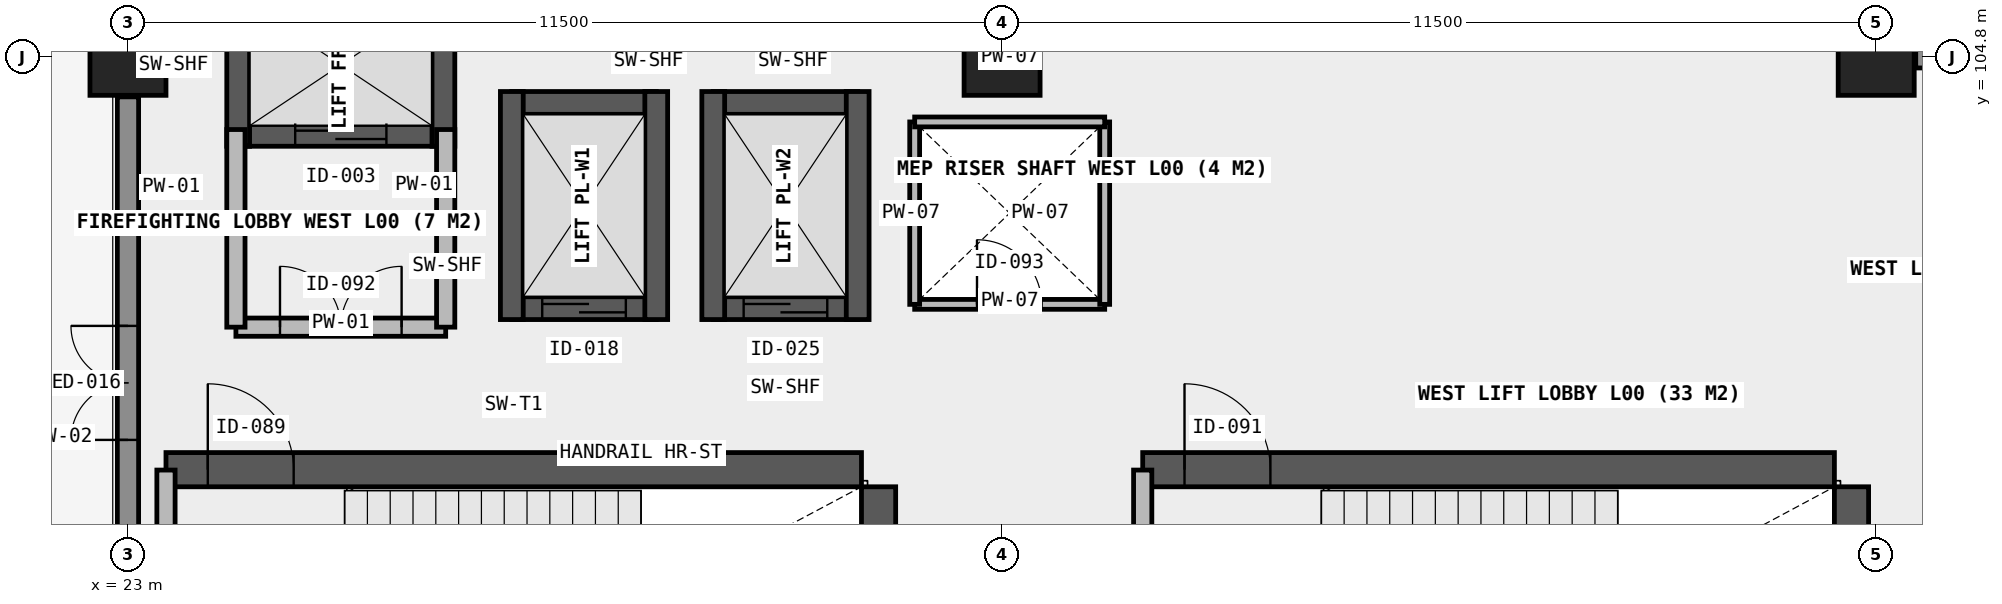
"""IFC4 building model, lengths in metres.
Left out: names, types, materials, properties, quantities, classifications, styles, units other than length and angle.
Written with IfcOpenShell. Run it as: python <this file> out.ifc"""

import sys

from ifc_helpers import new_model, si_unit, direction, frame, frame_2d, origin, origin_2d, place, context, subcontext, project, spatial, rectangle, extrude, element, fill, save


model = new_model("IFC4")
c1 = context("Model", 3, precision=1e-05, world=origin(), true_north=direction((0.0, 1.0)))
c2 = subcontext(c1, "Body", "Model", "MODEL_VIEW")
j1 = project(units=[si_unit("LENGTHUNIT", "METRE"), si_unit("PLANEANGLEUNIT", "RADIAN")], contexts=[c1])
p1 = place(None, origin())
s1 = spatial("IfcSite", under=j1, at=p1, CompositionType="ELEMENT")
p2 = place(p1, origin())
s2 = spatial("IfcBuilding", under=s1, at=p2, CompositionType="ELEMENT")
p3 = place(p2, origin())
s3 = spatial("IfcBuildingStorey", under=s2, at=p3, CompositionType="ELEMENT", Elevation=0.0)
for number, where, z_axis, x_axis in (
    (1, (23.0, 104.8, 0.0), (0.0, 0.0, 1.0), (1.0, 0.0, 0.0)),
    (2, (34.5, 104.8, 0.0), (0.0, 0.0, 1.0), (1.0, 0.0, 0.0)),
    (3, (46.0, 104.8, 0.0), (0.0, 0.0, 1.0), (1.0, 0.0, 0.0)),
):
    element("IfcColumn", number, at=place(p3, frame(where, z_axis=z_axis, x_axis=x_axis)), inside=s3, PredefinedType="COLUMN", context=c2, shape_type="SweptSolid", body=[
        extrude(rectangle(XDim=1.0, YDim=1.0, at=origin_2d()), origin(), (0.0, 0.0, 1.0), 4.2),
    ])
p4 = place(p3, frame((24.45, 103.78, 0.0), z_axis=(0.0, 0.0, 1.0), x_axis=(1.0, 0.0, 0.0)))
e4 = element("IfcWall", 4, at=p4, inside=s3, PredefinedType="SHEAR", context=c2, shape_type="SweptSolid", body=[
    extrude(rectangle(XDim=2.7, YDim=0.3, at=frame_2d((1.35, 0.0))), origin(), (0.0, 0.0, 1.0), 4.2),
])
p5 = place(p4, frame((0.75, 0.0, 0.0)))
e5 = element("IfcOpeningElement", 5, at=p5, cuts=e4, PredefinedType="OPENING", context=c2, shape_type="SweptSolid", body=[
    extrude(rectangle(XDim=1.2, YDim=2.15, at=frame_2d((0.6, 1.075))), frame((0.0, 0.16, 0.0), z_axis=(0.0, -1.0, 0.0), x_axis=(1.0, 0.0, 0.0)), (0.0, 0.0, 1.0), 0.32),
])
for number, where, z_axis, x_axis in (
    (6, (24.45, 103.63, 0.0), (0.0, 0.0, 1.0), (0.0, 1.0, 0.0)),
    (7, (27.15, 103.63, 0.0), (0.0, 0.0, 1.0), (0.0, 1.0, 0.0)),
):
    element("IfcWall", number, at=place(p3, frame(where, z_axis=z_axis, x_axis=x_axis)), inside=s3, PredefinedType="SHEAR", context=c2, shape_type="SweptSolid", body=[
        extrude(rectangle(XDim=2.14, YDim=0.3, at=frame_2d((1.07, 0.0))), origin(), (0.0, 0.0, 1.0), 4.2),
    ])
p6 = place(p3, frame((28.05, 101.5, 0.0), z_axis=(0.0, 0.0, 1.0), x_axis=(1.0, 0.0, 0.0)))
e8 = element("IfcWall", 8, at=p6, inside=s3, PredefinedType="SHEAR", context=c2, shape_type="SweptSolid", body=[
    extrude(rectangle(XDim=1.9, YDim=0.3, at=frame_2d((0.95, 0.0))), origin(), (0.0, 0.0, 1.0), 4.2),
])
p7 = place(p6, frame((0.4, 0.0, 0.0)))
e9 = element("IfcOpeningElement", 9, at=p7, cuts=e8, PredefinedType="OPENING", context=c2, shape_type="SweptSolid", body=[
    extrude(rectangle(XDim=1.1, YDim=2.15, at=frame_2d((0.55, 1.075))), frame((0.0, 0.16, 0.0), z_axis=(0.0, -1.0, 0.0), x_axis=(1.0, 0.0, 0.0)), (0.0, 0.0, 1.0), 0.32),
])
p8 = place(p3, frame((28.05, 104.2, 0.0), z_axis=(0.0, 0.0, 1.0), x_axis=(1.0, 0.0, 0.0)))
e10 = element("IfcWall", 10, at=p8, inside=s3, PredefinedType="SHEAR", context=c2, shape_type="SweptSolid", body=[
    extrude(rectangle(XDim=1.9, YDim=0.3, at=frame_2d((0.95, 0.0))), origin(), (0.0, 0.0, 1.0), 4.2),
])
for number, where, z_axis, x_axis in (
    (11, (28.05, 101.35, 0.0), (0.0, 0.0, 1.0), (0.0, 1.0, 0.0)),
    (12, (29.95, 101.35, 0.0), (0.0, 0.0, 1.0), (0.0, 1.0, 0.0)),
):
    element("IfcWall", number, at=place(p3, frame(where, z_axis=z_axis, x_axis=x_axis)), inside=s3, PredefinedType="SHEAR", context=c2, shape_type="SweptSolid", body=[
        extrude(rectangle(XDim=3.0, YDim=0.3, at=frame_2d((1.5, 0.0))), origin(), (0.0, 0.0, 1.0), 4.2),
    ])
p9 = place(p3, frame((30.7, 101.5, 0.0), z_axis=(0.0, 0.0, 1.0), x_axis=(1.0, 0.0, 0.0)))
e13 = element("IfcWall", 13, at=p9, inside=s3, PredefinedType="SHEAR", context=c2, shape_type="SweptSolid", body=[
    extrude(rectangle(XDim=1.9, YDim=0.3, at=frame_2d((0.95, 0.0))), origin(), (0.0, 0.0, 1.0), 4.2),
])
p10 = place(p9, frame((0.4, 0.0, 0.0)))
e14 = element("IfcOpeningElement", 14, at=p10, cuts=e13, PredefinedType="OPENING", context=c2, shape_type="SweptSolid", body=[
    extrude(rectangle(XDim=1.1, YDim=2.15, at=frame_2d((0.55, 1.075))), frame((0.0, 0.16, 0.0), z_axis=(0.0, -1.0, 0.0), x_axis=(1.0, 0.0, 0.0)), (0.0, 0.0, 1.0), 0.32),
])
p11 = place(p3, frame((30.7, 104.2, 0.0), z_axis=(0.0, 0.0, 1.0), x_axis=(1.0, 0.0, 0.0)))
e15 = element("IfcWall", 15, at=p11, inside=s3, PredefinedType="SHEAR", context=c2, shape_type="SweptSolid", body=[
    extrude(rectangle(XDim=1.9, YDim=0.3, at=frame_2d((0.95, 0.0))), origin(), (0.0, 0.0, 1.0), 4.2),
])
for number, where, z_axis, x_axis in (
    (16, (30.7, 101.35, 0.0), (0.0, 0.0, 1.0), (0.0, 1.0, 0.0)),
    (17, (32.6, 101.35, 0.0), (0.0, 0.0, 1.0), (0.0, 1.0, 0.0)),
):
    element("IfcWall", number, at=place(p3, frame(where, z_axis=z_axis, x_axis=x_axis)), inside=s3, PredefinedType="SHEAR", context=c2, shape_type="SweptSolid", body=[
        extrude(rectangle(XDim=3.0, YDim=0.3, at=frame_2d((1.5, 0.0))), origin(), (0.0, 0.0, 1.0), 4.2),
    ])
p12 = place(p3, frame((23.5, 99.375, 0.0), z_axis=(0.0, 0.0, 1.0), x_axis=(1.0, 0.0, 0.0)))
e18 = element("IfcWall", 18, at=p12, inside=s3, PredefinedType="SHEAR", context=c2, shape_type="SweptSolid", body=[
    extrude(rectangle(XDim=9.15, YDim=0.45, at=frame_2d((4.575, 0.0))), origin(), (0.0, 0.0, 1.0), 4.2),
])
p13 = place(p12, frame((0.55, 0.0, 0.0)))
e19 = element("IfcOpeningElement", 19, at=p13, cuts=e18, PredefinedType="OPENING", context=c2, shape_type="SweptSolid", body=[
    extrude(rectangle(XDim=1.13, YDim=2.15, at=frame_2d((0.565, 1.075))), frame((0.0, 0.235, 0.0), z_axis=(0.0, -1.0, 0.0), x_axis=(1.0, 0.0, 0.0)), (0.0, 0.0, 1.0), 0.47),
])
p14 = place(p3, frame((32.875, 95.55, 0.0), z_axis=(0.0, 0.0, 1.0), x_axis=(0.0, 1.0, 0.0)))
e20 = element("IfcWall", 20, at=p14, inside=s3, PredefinedType="SHEAR", context=c2, shape_type="SweptSolid", body=[
    extrude(rectangle(XDim=3.6, YDim=0.45, at=frame_2d((1.8, 0.0))), origin(), (0.0, 0.0, 1.0), 4.2),
])
p15 = place(p3, frame((36.35, 99.375, 0.0), z_axis=(0.0, 0.0, 1.0), x_axis=(1.0, 0.0, 0.0)))
e21 = element("IfcWall", 21, at=p15, inside=s3, PredefinedType="SHEAR", context=c2, shape_type="SweptSolid", body=[
    extrude(rectangle(XDim=9.1, YDim=0.45, at=frame_2d((4.55, 0.0))), origin(), (0.0, 0.0, 1.0), 4.2),
])
p16 = place(p15, frame((0.55, 0.0, 0.0)))
e22 = element("IfcOpeningElement", 22, at=p16, cuts=e21, PredefinedType="OPENING", context=c2, shape_type="SweptSolid", body=[
    extrude(rectangle(XDim=1.13, YDim=2.15, at=frame_2d((0.565, 1.075))), frame((0.0, 0.235, 0.0), z_axis=(0.0, -1.0, 0.0), x_axis=(1.0, 0.0, 0.0)), (0.0, 0.0, 1.0), 0.47),
])
p17 = place(p3, frame((45.675, 95.32, 0.0), z_axis=(0.0, 0.0, 1.0), x_axis=(0.0, 1.0, 0.0)))
e23 = element("IfcWall", 23, at=p17, inside=s3, PredefinedType="SHEAR", context=c2, shape_type="SweptSolid", body=[
    extrude(rectangle(XDim=3.83, YDim=0.45, at=frame_2d((1.915, 0.0))), origin(), (0.0, 0.0, 1.0), 4.2),
])
p18 = place(p3, frame((46.52, 104.8, 0.0), z_axis=(0.0, 0.0, 1.0), x_axis=(1.0, 0.0, 0.0)))
e24 = element("IfcWall", 24, at=p18, inside=s3, PredefinedType="SOLIDWALL", context=c2, shape_type="SweptSolid", body=[
    extrude(rectangle(XDim=10.46, YDim=0.28, at=frame_2d((5.23, 0.0))), origin(), (0.0, 0.0, 1.0), 3.15),
])
p19 = place(p18, frame((4.23, 0.0, 0.0)))
e25 = element("IfcOpeningElement", 25, at=p19, cuts=e24, PredefinedType="OPENING", context=c2, shape_type="SweptSolid", body=[
    extrude(rectangle(XDim=2.0, YDim=2.4, at=frame_2d((1.0, 1.2))), frame((0.0, 0.15, 0.0), z_axis=(0.0, -1.0, 0.0), x_axis=(1.0, 0.0, 0.0)), (0.0, 0.0, 1.0), 0.3),
])
p20 = place(p18, frame((1.215, 0.0, 0.78)))
e26 = element("IfcOpeningElement", 26, at=p20, cuts=e24, PredefinedType="OPENING", context=c2, shape_type="SweptSolid", body=[
    extrude(rectangle(XDim=1.8, YDim=1.95, at=frame_2d((0.9, 0.975))), frame((0.0, 0.15, 0.0), z_axis=(0.0, -1.0, 0.0), x_axis=(1.0, 0.0, 0.0)), (0.0, 0.0, 1.0), 0.3),
])
p21 = place(p3, frame((23.0, 95.32, 0.0), z_axis=(0.0, 0.0, 1.0), x_axis=(0.0, 1.0, 0.0)))
e27 = element("IfcWall", 27, at=p21, inside=s3, PredefinedType="SOLIDWALL", context=c2, shape_type="SweptSolid", body=[
    extrude(rectangle(XDim=8.96, YDim=0.28, at=frame_2d((4.48, 0.0))), origin(), (0.0, 0.0, 1.0), 3.15),
])
p22 = place(p21, frame((4.447, 0.0, 0.0)))
e28 = element("IfcOpeningElement", 28, at=p22, cuts=e27, PredefinedType="OPENING", context=c2, shape_type="SweptSolid", body=[
    extrude(rectangle(XDim=1.5, YDim=2.3, at=frame_2d((0.75, 1.15))), frame((0.0, 0.15, 0.0), z_axis=(0.0, -1.0, 0.0), x_axis=(1.0, 0.0, 0.0)), (0.0, 0.0, 1.0), 0.3),
])
p23 = place(p21, frame((1.323, 0.0, 0.78)))
e29 = element("IfcOpeningElement", 29, at=p23, cuts=e27, PredefinedType="OPENING", context=c2, shape_type="SweptSolid", body=[
    extrude(rectangle(XDim=1.8, YDim=1.95, at=frame_2d((0.9, 0.975))), frame((0.0, 0.15, 0.0), z_axis=(0.0, -1.0, 0.0), x_axis=(1.0, 0.0, 0.0)), (0.0, 0.0, 1.0), 0.3),
])
p24 = place(p3, frame((23.5, 95.33, 0.0), z_axis=(0.0, 0.0, 1.0), x_axis=(0.0, 1.0, 0.0)))
e30 = element("IfcWall", 30, at=p24, inside=s3, PredefinedType="SOLIDWALL", context=c2, shape_type="SweptSolid", body=[
    extrude(rectangle(XDim=4.04, YDim=0.24, at=frame_2d((2.02, 0.0))), origin(), (0.0, 0.0, 1.0), 3.88),
])
p25 = place(p24, frame((1.45, 0.0, 0.0)))
e31 = element("IfcOpeningElement", 31, at=p25, cuts=e30, PredefinedType="OPENING", context=c2, shape_type="SweptSolid", body=[
    extrude(rectangle(XDim=1.13, YDim=2.15, at=frame_2d((0.565, 1.075))), frame((0.0, 0.13, 0.0), z_axis=(0.0, -1.0, 0.0), x_axis=(1.0, 0.0, 0.0)), (0.0, 0.0, 1.0), 0.26),
])
p26 = place(p3, frame((36.35, 95.33, 0.0), z_axis=(0.0, 0.0, 1.0), x_axis=(0.0, 1.0, 0.0)))
e32 = element("IfcWall", 32, at=p26, inside=s3, PredefinedType="SOLIDWALL", context=c2, shape_type="SweptSolid", body=[
    extrude(rectangle(XDim=4.04, YDim=0.24, at=frame_2d((2.02, 0.0))), origin(), (0.0, 0.0, 1.0), 3.88),
])
p27 = place(p26, frame((1.45, 0.0, 0.0)))
e33 = element("IfcOpeningElement", 33, at=p27, cuts=e32, PredefinedType="OPENING", context=c2, shape_type="SweptSolid", body=[
    extrude(rectangle(XDim=1.13, YDim=2.15, at=frame_2d((0.565, 1.075))), frame((0.0, 0.13, 0.0), z_axis=(0.0, -1.0, 0.0), x_axis=(1.0, 0.0, 0.0)), (0.0, 0.0, 1.0), 0.26),
])
p28 = place(p3, frame((24.42, 101.25, 0.0), z_axis=(0.0, 0.0, 1.0), x_axis=(1.0, 0.0, 0.0)))
e34 = element("IfcWall", 34, at=p28, inside=s3, PredefinedType="SOLIDWALL", context=c2, shape_type="SweptSolid", body=[
    extrude(rectangle(XDim=2.76, YDim=0.24, at=frame_2d((1.38, 0.0))), origin(), (0.0, 0.0, 1.0), 3.88),
])
p29 = place(p28, frame((0.58, 0.0, 0.0)))
e35 = element("IfcOpeningElement", 35, at=p29, cuts=e34, PredefinedType="OPENING", context=c2, shape_type="SweptSolid", body=[
    extrude(rectangle(XDim=1.6, YDim=2.15, at=frame_2d((0.8, 1.075))), frame((0.0, 0.13, 0.0), z_axis=(0.0, -1.0, 0.0), x_axis=(1.0, 0.0, 0.0)), (0.0, 0.0, 1.0), 0.26),
])
for number, where, z_axis, x_axis in (
    (36, (24.42, 101.25, 0.0), (0.0, 0.0, 1.0), (0.0, 1.0, 0.0)),
    (37, (27.18, 101.25, 0.0), (0.0, 0.0, 1.0), (0.0, 1.0, 0.0)),
):
    element("IfcWall", number, at=place(p3, frame(where, z_axis=z_axis, x_axis=x_axis)), inside=s3, PredefinedType="SOLIDWALL", context=c2, shape_type="SweptSolid", body=[
        extrude(rectangle(XDim=2.6, YDim=0.24, at=frame_2d((1.3, 0.0))), origin(), (0.0, 0.0, 1.0), 3.88),
    ])
p30 = place(p3, frame((33.35, 101.55, 0.0), z_axis=(0.0, 0.0, 1.0), x_axis=(1.0, 0.0, 0.0)))
e38 = element("IfcWall", 38, at=p30, inside=s3, PredefinedType="PLUMBINGWALL", context=c2, shape_type="SweptSolid", body=[
    extrude(rectangle(XDim=2.5, YDim=0.13, at=frame_2d((1.25, 0.0))), origin(), (0.0, 0.0, 1.0), 3.88),
])
p31 = place(p30, frame((0.82, 0.0, 0.0)))
e39 = element("IfcOpeningElement", 39, at=p31, cuts=e38, PredefinedType="OPENING", context=c2, shape_type="SweptSolid", body=[
    extrude(rectangle(XDim=0.85, YDim=2.0, at=frame_2d((0.425, 1.0))), frame((0.0, 0.075, 0.0), z_axis=(0.0, -1.0, 0.0), x_axis=(1.0, 0.0, 0.0)), (0.0, 0.0, 1.0), 0.15),
])
for number, where, z_axis, x_axis in (
    (40, (33.35, 101.55, 0.0), (0.0, 0.0, 1.0), (0.0, 1.0, 0.0)),
    (41, (35.85, 101.55, 0.0), (0.0, 0.0, 1.0), (0.0, 1.0, 0.0)),
):
    element("IfcWall", number, at=place(p3, frame(where, z_axis=z_axis, x_axis=x_axis)), inside=s3, PredefinedType="PLUMBINGWALL", context=c2, shape_type="SweptSolid", body=[
        extrude(rectangle(XDim=2.4, YDim=0.13, at=frame_2d((1.2, 0.0))), origin(), (0.0, 0.0, 1.0), 3.88),
    ])
p32 = place(p3, frame((33.35, 103.95, 0.0), z_axis=(0.0, 0.0, 1.0), x_axis=(1.0, 0.0, 0.0)))
e42 = element("IfcWall", 42, at=p32, inside=s3, PredefinedType="PLUMBINGWALL", context=c2, shape_type="SweptSolid", body=[
    extrude(rectangle(XDim=2.5, YDim=0.13, at=frame_2d((1.25, 0.0))), origin(), (0.0, 0.0, 1.0), 3.88),
])
p33 = place(p22, origin())
e43 = element("IfcDoor", 43, at=p33, inside=s3, OperationType="DOUBLE_DOOR_SINGLE_SWING", PredefinedType="DOOR", context=c2, shape_type="SweptSolid", body=[
    extrude(rectangle(XDim=1.5, YDim=2.3, at=frame_2d((0.75, 1.15))), frame((0.0, 0.025, 0.0), z_axis=(0.0, -1.0, 0.0), x_axis=(1.0, 0.0, 0.0)), (0.0, 0.0, 1.0), 0.05),
])
fill(e28, e43)
p34 = place(p5, origin())
e44 = element("IfcDoor", 44, at=p34, inside=s3, OperationType="SLIDING_TO_RIGHT", PredefinedType="DOOR", context=c2, shape_type="SweptSolid", body=[
    extrude(rectangle(XDim=1.2, YDim=2.15, at=frame_2d((0.6, 1.075))), frame((0.0, 0.025, 0.0), z_axis=(0.0, -1.0, 0.0), x_axis=(1.0, 0.0, 0.0)), (0.0, 0.0, 1.0), 0.05),
])
fill(e5, e44)
p35 = place(p7, origin())
e45 = element("IfcDoor", 45, at=p35, inside=s3, OperationType="SLIDING_TO_LEFT", PredefinedType="DOOR", context=c2, shape_type="SweptSolid", body=[
    extrude(rectangle(XDim=1.1, YDim=2.15, at=frame_2d((0.55, 1.075))), frame((0.0, 0.025, 0.0), z_axis=(0.0, -1.0, 0.0), x_axis=(1.0, 0.0, 0.0)), (0.0, 0.0, 1.0), 0.05),
])
fill(e9, e45)
p36 = place(p10, origin())
e46 = element("IfcDoor", 46, at=p36, inside=s3, OperationType="SLIDING_TO_LEFT", PredefinedType="DOOR", context=c2, shape_type="SweptSolid", body=[
    extrude(rectangle(XDim=1.1, YDim=2.15, at=frame_2d((0.55, 1.075))), frame((0.0, 0.025, 0.0), z_axis=(0.0, -1.0, 0.0), x_axis=(1.0, 0.0, 0.0)), (0.0, 0.0, 1.0), 0.05),
])
fill(e14, e46)
p37 = place(p13, origin())
e47 = element("IfcDoor", 47, at=p37, inside=s3, OperationType="SINGLE_SWING_LEFT", PredefinedType="DOOR", context=c2, shape_type="SweptSolid", body=[
    extrude(rectangle(XDim=1.13, YDim=2.15, at=frame_2d((0.565, 1.075))), frame((0.0, 0.025, 0.0), z_axis=(0.0, -1.0, 0.0), x_axis=(1.0, 0.0, 0.0)), (0.0, 0.0, 1.0), 0.05),
])
fill(e19, e47)
p38 = place(p16, origin())
e48 = element("IfcDoor", 48, at=p38, inside=s3, OperationType="SINGLE_SWING_LEFT", PredefinedType="DOOR", context=c2, shape_type="SweptSolid", body=[
    extrude(rectangle(XDim=1.13, YDim=2.15, at=frame_2d((0.565, 1.075))), frame((0.0, 0.025, 0.0), z_axis=(0.0, -1.0, 0.0), x_axis=(1.0, 0.0, 0.0)), (0.0, 0.0, 1.0), 0.05),
])
fill(e22, e48)
p39 = place(p29, origin())
e49 = element("IfcDoor", 49, at=p39, inside=s3, OperationType="DOUBLE_DOOR_SINGLE_SWING", PredefinedType="DOOR", context=c2, shape_type="SweptSolid", body=[
    extrude(rectangle(XDim=1.6, YDim=2.15, at=frame_2d((0.8, 1.075))), frame((0.0, 0.025, 0.0), z_axis=(0.0, -1.0, 0.0), x_axis=(1.0, 0.0, 0.0)), (0.0, 0.0, 1.0), 0.05),
])
fill(e35, e49)
p40 = place(p31, origin())
e50 = element("IfcDoor", 50, at=p40, inside=s3, OperationType="SINGLE_SWING_LEFT", PredefinedType="TRAPDOOR", context=c2, shape_type="SweptSolid", body=[
    extrude(rectangle(XDim=0.85, YDim=2.0, at=frame_2d((0.425, 1.0))), frame((0.0, 0.025, 0.0), z_axis=(0.0, -1.0, 0.0), x_axis=(1.0, 0.0, 0.0)), (0.0, 0.0, 1.0), 0.05),
])
fill(e39, e50)
save(model, sys.argv[1])
